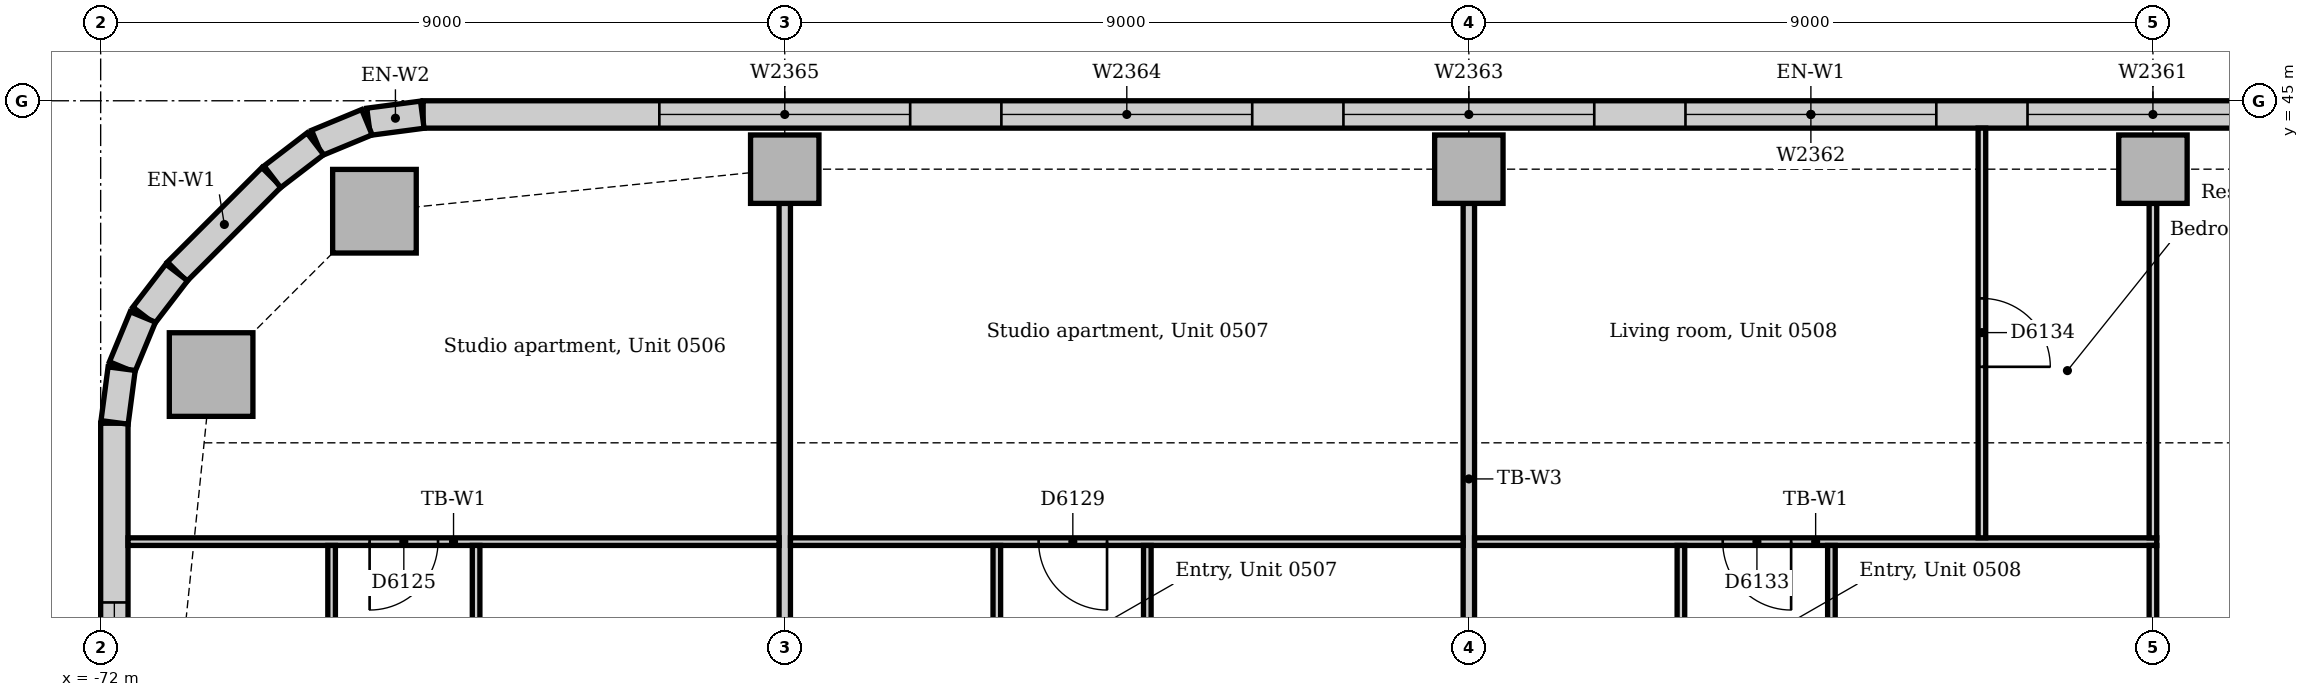
"""IFC4 building model, lengths in metres.
Left out: names, types, materials, properties, quantities, classifications, styles, units other than length and angle.
Written with IfcOpenShell. Run it as: python <this file> out.ifc"""

import sys

from ifc_helpers import new_model, si_unit, direction, frame, frame_2d, origin, origin_2d, place, context, subcontext, project, spatial, rectangle, extrude, element, fill, save


model = new_model("IFC4")
c1 = context("Model", 3, precision=1e-05, world=origin(), true_north=direction((0.0, 1.0)))
c2 = subcontext(c1, "Body", "Model", "MODEL_VIEW")
j1 = project(units=[si_unit("LENGTHUNIT", "METRE"), si_unit("PLANEANGLEUNIT", "RADIAN")], contexts=[c1])
p1 = place(None, origin())
s1 = spatial("IfcSite", under=j1, at=p1, CompositionType="ELEMENT")
p2 = place(p1, origin())
s2 = spatial("IfcBuilding", under=s1, at=p2, CompositionType="ELEMENT")
p3 = place(p2, frame((0.0, 0.0, 26.0)))
s3 = spatial("IfcBuildingStorey", under=s2, at=p3, CompositionType="ELEMENT", Elevation=26.0)
for number, where, z_axis, x_axis in (
    (1, (-68.398, 43.547, 0.0), (0.0, 0.0, 1.0), (1.0, 0.0, 0.0)),
    (2, (-70.547, 41.398, 0.0), (0.0, 0.0, 1.0), (1.0, 0.0, 0.0)),
):
    element("IfcColumn", number, at=place(p3, frame(where, z_axis=z_axis, x_axis=x_axis)), inside=s3, PredefinedType="COLUMN", context=c2, shape_type="SweptSolid", body=[
        extrude(rectangle(XDim=1.1, YDim=1.1, at=origin_2d()), origin(), (0.0, 0.0, 1.0), 3.85),
    ])
for number, where, z_axis, x_axis in (
    (3, (-63.0, 44.1, 0.0), (0.0, 0.0, 1.0), (1.0, 0.0, 0.0)),
    (4, (-54.0, 44.1, 0.0), (0.0, 0.0, 1.0), (1.0, 0.0, 0.0)),
    (5, (-45.0, 44.1, 0.0), (0.0, 0.0, 1.0), (1.0, 0.0, 0.0)),
):
    element("IfcColumn", number, at=place(p3, frame(where, z_axis=z_axis, x_axis=x_axis)), inside=s3, PredefinedType="COLUMN", context=c2, shape_type="SweptSolid", body=[
        extrude(rectangle(XDim=0.9, YDim=0.9, at=origin_2d()), origin(), (0.0, 0.0, 1.0), 3.85),
    ])
p4 = place(p3, frame((-31.243, 44.82, 0.0), z_axis=(0.0, 0.0, 1.0), x_axis=(-1.0, 0.0, 0.0)))
e6 = element("IfcWall", 6, at=p4, inside=s3, PredefinedType="STANDARD", context=c2, shape_type="SweptSolid", body=[
    extrude(rectangle(XDim=36.515, YDim=0.36, at=frame_2d((18.257, 0.0))), origin(), (0.0, 0.0, 1.0), 3.85),
])
p5 = place(p4, frame((3.107, 0.0, 0.9)))
e7 = element("IfcOpeningElement", 7, at=p5, cuts=e6, PredefinedType="OPENING", context=c2, shape_type="SweptSolid", body=[
    extrude(rectangle(XDim=3.3, YDim=1.6, at=frame_2d((1.65, 0.8))), frame((0.0, 0.19, 0.0), z_axis=(0.0, -1.0, 0.0), x_axis=(1.0, 0.0, 0.0)), (0.0, 0.0, 1.0), 0.38),
])
p6 = place(p4, frame((7.607, 0.0, 0.9)))
e8 = element("IfcOpeningElement", 8, at=p6, cuts=e6, PredefinedType="OPENING", context=c2, shape_type="SweptSolid", body=[
    extrude(rectangle(XDim=3.3, YDim=1.6, at=frame_2d((1.65, 0.8))), frame((0.0, 0.19, 0.0), z_axis=(0.0, -1.0, 0.0), x_axis=(1.0, 0.0, 0.0)), (0.0, 0.0, 1.0), 0.38),
])
p7 = place(p4, frame((12.107, 0.0, 0.9)))
e9 = element("IfcOpeningElement", 9, at=p7, cuts=e6, PredefinedType="OPENING", context=c2, shape_type="SweptSolid", body=[
    extrude(rectangle(XDim=3.3, YDim=1.6, at=frame_2d((1.65, 0.8))), frame((0.0, 0.19, 0.0), z_axis=(0.0, -1.0, 0.0), x_axis=(1.0, 0.0, 0.0)), (0.0, 0.0, 1.0), 0.38),
])
p8 = place(p4, frame((16.607, 0.0, 0.9)))
e10 = element("IfcOpeningElement", 10, at=p8, cuts=e6, PredefinedType="OPENING", context=c2, shape_type="SweptSolid", body=[
    extrude(rectangle(XDim=3.3, YDim=1.6, at=frame_2d((1.65, 0.8))), frame((0.0, 0.19, 0.0), z_axis=(0.0, -1.0, 0.0), x_axis=(1.0, 0.0, 0.0)), (0.0, 0.0, 1.0), 0.38),
])
p9 = place(p4, frame((21.107, 0.0, 0.9)))
e11 = element("IfcOpeningElement", 11, at=p9, cuts=e6, PredefinedType="OPENING", context=c2, shape_type="SweptSolid", body=[
    extrude(rectangle(XDim=3.3, YDim=1.6, at=frame_2d((1.65, 0.8))), frame((0.0, 0.19, 0.0), z_axis=(0.0, -1.0, 0.0), x_axis=(1.0, 0.0, 0.0)), (0.0, 0.0, 1.0), 0.38),
])
p10 = place(p4, frame((25.607, 0.0, 0.9)))
e12 = element("IfcOpeningElement", 12, at=p10, cuts=e6, PredefinedType="OPENING", context=c2, shape_type="SweptSolid", body=[
    extrude(rectangle(XDim=3.3, YDim=1.6, at=frame_2d((1.65, 0.8))), frame((0.0, 0.19, 0.0), z_axis=(0.0, -1.0, 0.0), x_axis=(1.0, 0.0, 0.0)), (0.0, 0.0, 1.0), 0.38),
])
p11 = place(p4, frame((30.107, 0.0, 0.9)))
e13 = element("IfcOpeningElement", 13, at=p11, cuts=e6, PredefinedType="OPENING", context=c2, shape_type="SweptSolid", body=[
    extrude(rectangle(XDim=3.3, YDim=1.6, at=frame_2d((1.65, 0.8))), frame((0.0, 0.19, 0.0), z_axis=(0.0, -1.0, 0.0), x_axis=(1.0, 0.0, 0.0)), (0.0, 0.0, 1.0), 0.38),
])
p12 = place(p3, frame((-69.751, 43.994, 0.0), z_axis=(0.0, 0.0, 1.0), x_axis=(-0.707106781187, -0.707106781187, 0.0)))
e14 = element("IfcWall", 14, at=p12, inside=s3, PredefinedType="STANDARD", context=c2, shape_type="SweptSolid", body=[
    extrude(rectangle(XDim=1.757, YDim=0.36, at=frame_2d((0.879, 0.0))), origin(), (0.0, 0.0, 1.0), 3.85),
])
p13 = place(p3, frame((-71.82, 40.757, 0.0), z_axis=(0.0, 0.0, 1.0), x_axis=(0.0, -1.0, 0.0)))
e15 = element("IfcWall", 15, at=p13, inside=s3, PredefinedType="STANDARD", context=c2, shape_type="SweptSolid", body=[
    extrude(rectangle(XDim=26.015, YDim=0.36, at=frame_2d((13.007, 0.0))), origin(), (0.0, 0.0, 1.0), 3.85),
])
p14 = place(p13, frame((2.357, 0.0, 0.9)))
e16 = element("IfcOpeningElement", 16, at=p14, cuts=e15, PredefinedType="OPENING", context=c2, shape_type="SweptSolid", body=[
    extrude(rectangle(XDim=3.3, YDim=1.6, at=frame_2d((1.65, 0.8))), frame((0.0, 0.19, 0.0), z_axis=(0.0, -1.0, 0.0), x_axis=(1.0, 0.0, 0.0)), (0.0, 0.0, 1.0), 0.38),
])
p15 = place(p13, frame((7.057, 0.0, 0.9)))
e17 = element("IfcOpeningElement", 17, at=p15, cuts=e15, PredefinedType="OPENING", context=c2, shape_type="SweptSolid", body=[
    extrude(rectangle(XDim=3.3, YDim=1.6, at=frame_2d((1.65, 0.8))), frame((0.0, 0.19, 0.0), z_axis=(0.0, -1.0, 0.0), x_axis=(1.0, 0.0, 0.0)), (0.0, 0.0, 1.0), 0.38),
])
p16 = place(p13, frame((11.357, 0.0, 0.9)))
e18 = element("IfcOpeningElement", 18, at=p16, cuts=e15, PredefinedType="OPENING", context=c2, shape_type="SweptSolid", body=[
    extrude(rectangle(XDim=3.3, YDim=1.6, at=frame_2d((1.65, 0.8))), frame((0.0, 0.19, 0.0), z_axis=(0.0, -1.0, 0.0), x_axis=(1.0, 0.0, 0.0)), (0.0, 0.0, 1.0), 0.38),
])
p17 = place(p13, frame((15.857, 0.0, 0.9)))
e19 = element("IfcOpeningElement", 19, at=p17, cuts=e15, PredefinedType="OPENING", context=c2, shape_type="SweptSolid", body=[
    extrude(rectangle(XDim=3.3, YDim=1.6, at=frame_2d((1.65, 0.8))), frame((0.0, 0.19, 0.0), z_axis=(0.0, -1.0, 0.0), x_axis=(1.0, 0.0, 0.0)), (0.0, 0.0, 1.0), 0.38),
])
p18 = place(p13, frame((20.957, 0.0, 0.9)))
e20 = element("IfcOpeningElement", 20, at=p18, cuts=e15, PredefinedType="OPENING", context=c2, shape_type="SweptSolid", body=[
    extrude(rectangle(XDim=3.3, YDim=1.6, at=frame_2d((1.65, 0.8))), frame((0.0, 0.19, 0.0), z_axis=(0.0, -1.0, 0.0), x_axis=(1.0, 0.0, 0.0)), (0.0, 0.0, 1.0), 0.38),
])
for number, where, z_axis, x_axis in (
    (21, (-67.769, 44.817, 0.0), (0.0, 0.0, 1.0), (-0.991, -0.131, 0.0)),
    (22, (-68.497, 44.718, 0.0), (0.0, 0.0, 1.0), (-0.924, -0.383, 0.0)),
):
    element("IfcWall", number, at=place(p3, frame(where, z_axis=z_axis, x_axis=x_axis)), inside=s3, PredefinedType="STANDARD", context=c2, shape_type="SweptSolid", body=[
        extrude(rectangle(XDim=0.713, YDim=0.36, at=frame_2d((0.356, 0.0))), origin(), (0.0, 0.0, 1.0), 3.85),
    ])
for number, where, z_axis, x_axis in (
    (23, (-69.175, 44.434, 0.0), (0.0, 0.0, 1.0), (-0.793, -0.609, 0.0)),
    (24, (-71.0, 42.741, 0.0), (0.0, 0.0, 1.0), (-0.609, -0.793, 0.0)),
):
    element("IfcWall", number, at=place(p3, frame(where, z_axis=z_axis, x_axis=x_axis)), inside=s3, PredefinedType="STANDARD", context=c2, shape_type="SweptSolid", body=[
        extrude(rectangle(XDim=0.713, YDim=0.36, at=frame_2d((0.357, 0.0))), origin(), (0.0, 0.0, 1.0), 3.85),
    ])
for number, where, z_axis, x_axis in (
    (25, (-71.445, 42.156, 0.0), (0.0, 0.0, 1.0), (-0.383, -0.924, 0.0)),
    (26, (-71.724, 41.476, 0.0), (0.0, 0.0, 1.0), (-0.131, -0.991, 0.0)),
):
    element("IfcWall", number, at=place(p3, frame(where, z_axis=z_axis, x_axis=x_axis)), inside=s3, PredefinedType="STANDARD", context=c2, shape_type="SweptSolid", body=[
        extrude(rectangle(XDim=0.713, YDim=0.36, at=frame_2d((0.356, 0.0))), origin(), (0.0, 0.0, 1.0), 3.85),
    ])
for number, where, z_axis, x_axis in (
    (27, (-63.0, 36.4, 0.0), (0.0, 0.0, 1.0), (0.0, 1.0, 0.0)),
    (28, (-54.0, 36.4, 0.0), (0.0, 0.0, 1.0), (0.0, 1.0, 0.0)),
):
    element("IfcWall", number, at=place(p3, frame(where, z_axis=z_axis, x_axis=x_axis)), inside=s3, PredefinedType="PARTITIONING", context=c2, shape_type="SweptSolid", body=[
        extrude(rectangle(XDim=7.25, YDim=0.15, at=frame_2d((3.625, 0.0))), origin(), (0.0, 0.0, 1.0), 3.158),
    ])
p19 = place(p3, frame((-53.925, 39.2, 0.0), z_axis=(0.0, 0.0, 1.0), x_axis=(1.0, 0.0, 0.0)))
e29 = element("IfcWall", 29, at=p19, inside=s3, PredefinedType="PARTITIONING", context=c2, shape_type="SweptSolid", body=[
    extrude(rectangle(XDim=8.975, YDim=0.1, at=frame_2d((4.487, 0.0))), origin(), (0.0, 0.0, 1.0), 3.85),
])
p20 = place(p19, frame((3.265, 0.0, 0.0)))
e30 = element("IfcOpeningElement", 30, at=p20, cuts=e29, PredefinedType="OPENING", context=c2, shape_type="SweptSolid", body=[
    extrude(rectangle(XDim=0.9, YDim=2.1, at=frame_2d((0.45, 1.05))), frame((0.0, 0.06, 0.0), z_axis=(0.0, -1.0, 0.0), x_axis=(1.0, 0.0, 0.0)), (0.0, 0.0, 1.0), 0.12),
])
p21 = place(p3, frame((-62.925, 39.2, 0.0), z_axis=(0.0, 0.0, 1.0), x_axis=(1.0, 0.0, 0.0)))
e31 = element("IfcWall", 31, at=p21, inside=s3, PredefinedType="PARTITIONING", context=c2, shape_type="SweptSolid", body=[
    extrude(rectangle(XDim=8.85, YDim=0.1, at=frame_2d((4.425, 0.0))), origin(), (0.0, 0.0, 1.0), 3.85),
])
p22 = place(p21, frame((3.265, 0.0, 0.0)))
e32 = element("IfcOpeningElement", 32, at=p22, cuts=e31, PredefinedType="OPENING", context=c2, shape_type="SweptSolid", body=[
    extrude(rectangle(XDim=0.9, YDim=2.1, at=frame_2d((0.45, 1.05))), frame((0.0, 0.06, 0.0), z_axis=(0.0, -1.0, 0.0), x_axis=(1.0, 0.0, 0.0)), (0.0, 0.0, 1.0), 0.12),
])
p23 = place(p3, frame((-71.64, 39.2, 0.0), z_axis=(0.0, 0.0, 1.0), x_axis=(1.0, 0.0, 0.0)))
e33 = element("IfcWall", 33, at=p23, inside=s3, PredefinedType="PARTITIONING", context=c2, shape_type="SweptSolid", body=[
    extrude(rectangle(XDim=8.565, YDim=0.1, at=frame_2d((4.282, 0.0))), origin(), (0.0, 0.0, 1.0), 3.85),
])
p24 = place(p23, frame((3.178, 0.0, 0.0)))
e34 = element("IfcOpeningElement", 34, at=p24, cuts=e33, PredefinedType="OPENING", context=c2, shape_type="SweptSolid", body=[
    extrude(rectangle(XDim=0.9, YDim=2.1, at=frame_2d((0.45, 1.05))), frame((0.0, 0.06, 0.0), z_axis=(0.0, -1.0, 0.0), x_axis=(1.0, 0.0, 0.0)), (0.0, 0.0, 1.0), 0.12),
])
p25 = place(p3, frame((-45.0, 39.25, 0.0), z_axis=(0.0, 0.0, 1.0), x_axis=(0.0, 1.0, 0.0)))
e35 = element("IfcWall", 35, at=p25, inside=s3, PredefinedType="PARTITIONING", context=c2, shape_type="SweptSolid", body=[
    extrude(rectangle(XDim=4.4, YDim=0.1, at=frame_2d((2.2, 0.0))), origin(), (0.0, 0.0, 1.0), 3.158),
])
p26 = place(p3, frame((-45.0, 36.4, 0.0), z_axis=(0.0, 0.0, 1.0), x_axis=(0.0, 1.0, 0.0)))
e36 = element("IfcWall", 36, at=p26, inside=s3, PredefinedType="PARTITIONING", context=c2, shape_type="SweptSolid", body=[
    extrude(rectangle(XDim=2.75, YDim=0.1, at=frame_2d((1.375, 0.0))), origin(), (0.0, 0.0, 1.0), 3.158),
])
p27 = place(p3, frame((-47.25, 39.25, 0.0), z_axis=(0.0, 0.0, 1.0), x_axis=(0.0, 1.0, 0.0)))
e37 = element("IfcWall", 37, at=p27, inside=s3, PredefinedType="PARTITIONING", context=c2, shape_type="SweptSolid", body=[
    extrude(rectangle(XDim=5.39, YDim=0.1, at=frame_2d((2.695, 0.0))), origin(), (0.0, 0.0, 1.0), 3.85),
])
p28 = place(p27, frame((2.25, 0.0, 0.0)))
e38 = element("IfcOpeningElement", 38, at=p28, cuts=e37, PredefinedType="OPENING", context=c2, shape_type="SweptSolid", body=[
    extrude(rectangle(XDim=0.9, YDim=2.1, at=frame_2d((0.45, 1.05))), frame((0.0, 0.06, 0.0), z_axis=(0.0, -1.0, 0.0), x_axis=(1.0, 0.0, 0.0)), (0.0, 0.0, 1.0), 0.12),
])
p29 = place(p3, frame((-68.962, 36.075, 0.0), z_axis=(0.0, 0.0, 1.0), x_axis=(0.0, 1.0, 0.0)))
e39 = element("IfcWall", 39, at=p29, inside=s3, PredefinedType="PARTITIONING", context=c2, shape_type="SweptSolid", body=[
    extrude(rectangle(XDim=3.075, YDim=0.1, at=frame_2d((1.538, 0.0))), origin(), (0.0, 0.0, 1.0), 3.85),
])
p30 = place(p29, frame((1.1, 0.0, 0.0)))
e40 = element("IfcOpeningElement", 40, at=p30, cuts=e39, PredefinedType="OPENING", context=c2, shape_type="SweptSolid", body=[
    extrude(rectangle(XDim=0.9, YDim=2.1, at=frame_2d((0.45, 1.05))), frame((0.0, 0.06, 0.0), z_axis=(0.0, -1.0, 0.0), x_axis=(1.0, 0.0, 0.0)), (0.0, 0.0, 1.0), 0.12),
])
p31 = place(p3, frame((-67.061, 36.075, 0.0), z_axis=(0.0, 0.0, 1.0), x_axis=(0.0, 1.0, 0.0)))
e41 = element("IfcWall", 41, at=p31, inside=s3, PredefinedType="PARTITIONING", context=c2, shape_type="SweptSolid", body=[
    extrude(rectangle(XDim=3.075, YDim=0.1, at=frame_2d((1.538, 0.0))), origin(), (0.0, 0.0, 1.0), 3.85),
])
p32 = place(p31, frame((1.1, 0.0, 0.0)))
e42 = element("IfcOpeningElement", 42, at=p32, cuts=e41, PredefinedType="OPENING", context=c2, shape_type="SweptSolid", body=[
    extrude(rectangle(XDim=0.9, YDim=2.1, at=frame_2d((0.45, 1.05))), frame((0.0, 0.06, 0.0), z_axis=(0.0, -1.0, 0.0), x_axis=(1.0, 0.0, 0.0)), (0.0, 0.0, 1.0), 0.12),
])
p33 = place(p3, frame((-60.21, 36.075, 0.0), z_axis=(0.0, 0.0, 1.0), x_axis=(0.0, 1.0, 0.0)))
e43 = element("IfcWall", 43, at=p33, inside=s3, PredefinedType="PARTITIONING", context=c2, shape_type="SweptSolid", body=[
    extrude(rectangle(XDim=3.075, YDim=0.1, at=frame_2d((1.538, 0.0))), origin(), (0.0, 0.0, 1.0), 3.85),
])
p34 = place(p33, frame((1.1, 0.0, 0.0)))
e44 = element("IfcOpeningElement", 44, at=p34, cuts=e43, PredefinedType="OPENING", context=c2, shape_type="SweptSolid", body=[
    extrude(rectangle(XDim=0.9, YDim=2.1, at=frame_2d((0.45, 1.05))), frame((0.0, 0.06, 0.0), z_axis=(0.0, -1.0, 0.0), x_axis=(1.0, 0.0, 0.0)), (0.0, 0.0, 1.0), 0.12),
])
p35 = place(p3, frame((-58.23, 36.075, 0.0), z_axis=(0.0, 0.0, 1.0), x_axis=(0.0, 1.0, 0.0)))
e45 = element("IfcWall", 45, at=p35, inside=s3, PredefinedType="PARTITIONING", context=c2, shape_type="SweptSolid", body=[
    extrude(rectangle(XDim=3.075, YDim=0.1, at=frame_2d((1.538, 0.0))), origin(), (0.0, 0.0, 1.0), 3.85),
])
p36 = place(p35, frame((1.1, 0.0, 0.0)))
e46 = element("IfcOpeningElement", 46, at=p36, cuts=e45, PredefinedType="OPENING", context=c2, shape_type="SweptSolid", body=[
    extrude(rectangle(XDim=0.9, YDim=2.1, at=frame_2d((0.45, 1.05))), frame((0.0, 0.06, 0.0), z_axis=(0.0, -1.0, 0.0), x_axis=(1.0, 0.0, 0.0)), (0.0, 0.0, 1.0), 0.12),
])
p37 = place(p3, frame((-51.21, 36.075, 0.0), z_axis=(0.0, 0.0, 1.0), x_axis=(0.0, 1.0, 0.0)))
e47 = element("IfcWall", 47, at=p37, inside=s3, PredefinedType="PARTITIONING", context=c2, shape_type="SweptSolid", body=[
    extrude(rectangle(XDim=3.075, YDim=0.1, at=frame_2d((1.538, 0.0))), origin(), (0.0, 0.0, 1.0), 3.85),
])
p38 = place(p37, frame((1.1, 0.0, 0.0)))
e48 = element("IfcOpeningElement", 48, at=p38, cuts=e47, PredefinedType="OPENING", context=c2, shape_type="SweptSolid", body=[
    extrude(rectangle(XDim=0.9, YDim=2.1, at=frame_2d((0.45, 1.05))), frame((0.0, 0.06, 0.0), z_axis=(0.0, -1.0, 0.0), x_axis=(1.0, 0.0, 0.0)), (0.0, 0.0, 1.0), 0.12),
])
p39 = place(p3, frame((-49.23, 36.075, 0.0), z_axis=(0.0, 0.0, 1.0), x_axis=(0.0, 1.0, 0.0)))
e49 = element("IfcWall", 49, at=p39, inside=s3, PredefinedType="PARTITIONING", context=c2, shape_type="SweptSolid", body=[
    extrude(rectangle(XDim=3.075, YDim=0.1, at=frame_2d((1.538, 0.0))), origin(), (0.0, 0.0, 1.0), 3.85),
])
p40 = place(p39, frame((1.1, 0.0, 0.0)))
e50 = element("IfcOpeningElement", 50, at=p40, cuts=e49, PredefinedType="OPENING", context=c2, shape_type="SweptSolid", body=[
    extrude(rectangle(XDim=0.9, YDim=2.1, at=frame_2d((0.45, 1.05))), frame((0.0, 0.06, 0.0), z_axis=(0.0, -1.0, 0.0), x_axis=(1.0, 0.0, 0.0)), (0.0, 0.0, 1.0), 0.12),
])
p41 = place(p7, origin())
e51 = element("IfcWindow", 51, at=p41, inside=s3, PartitioningType="SINGLE_PANEL", PredefinedType="WINDOW", context=c2, shape_type="SweptSolid", body=[
    extrude(rectangle(XDim=3.3, YDim=1.6, at=frame_2d((1.65, 0.8))), frame((0.0, 0.13, 0.0), z_axis=(0.0, -1.0, 0.0), x_axis=(1.0, 0.0, 0.0)), (0.0, 0.0, 1.0), 0.06),
])
fill(e9, e51)
p42 = place(p8, origin())
e52 = element("IfcWindow", 52, at=p42, inside=s3, PartitioningType="SINGLE_PANEL", PredefinedType="WINDOW", context=c2, shape_type="SweptSolid", body=[
    extrude(rectangle(XDim=3.3, YDim=1.6, at=frame_2d((1.65, 0.8))), frame((0.0, 0.13, 0.0), z_axis=(0.0, -1.0, 0.0), x_axis=(1.0, 0.0, 0.0)), (0.0, 0.0, 1.0), 0.06),
])
fill(e10, e52)
p43 = place(p9, origin())
e53 = element("IfcWindow", 53, at=p43, inside=s3, PartitioningType="SINGLE_PANEL", PredefinedType="WINDOW", context=c2, shape_type="SweptSolid", body=[
    extrude(rectangle(XDim=3.3, YDim=1.6, at=frame_2d((1.65, 0.8))), frame((0.0, 0.13, 0.0), z_axis=(0.0, -1.0, 0.0), x_axis=(1.0, 0.0, 0.0)), (0.0, 0.0, 1.0), 0.06),
])
fill(e11, e53)
p44 = place(p10, origin())
e54 = element("IfcWindow", 54, at=p44, inside=s3, PartitioningType="SINGLE_PANEL", PredefinedType="WINDOW", context=c2, shape_type="SweptSolid", body=[
    extrude(rectangle(XDim=3.3, YDim=1.6, at=frame_2d((1.65, 0.8))), frame((0.0, 0.13, 0.0), z_axis=(0.0, -1.0, 0.0), x_axis=(1.0, 0.0, 0.0)), (0.0, 0.0, 1.0), 0.06),
])
fill(e12, e54)
p45 = place(p11, origin())
e55 = element("IfcWindow", 55, at=p45, inside=s3, PartitioningType="SINGLE_PANEL", PredefinedType="WINDOW", context=c2, shape_type="SweptSolid", body=[
    extrude(rectangle(XDim=3.3, YDim=1.6, at=frame_2d((1.65, 0.8))), frame((0.0, 0.13, 0.0), z_axis=(0.0, -1.0, 0.0), x_axis=(1.0, 0.0, 0.0)), (0.0, 0.0, 1.0), 0.06),
])
fill(e13, e55)
p46 = place(p14, origin())
e56 = element("IfcWindow", 56, at=p46, inside=s3, PartitioningType="SINGLE_PANEL", PredefinedType="WINDOW", context=c2, shape_type="SweptSolid", body=[
    extrude(rectangle(XDim=3.3, YDim=1.6, at=frame_2d((1.65, 0.8))), frame((0.0, 0.13, 0.0), z_axis=(0.0, -1.0, 0.0), x_axis=(1.0, 0.0, 0.0)), (0.0, 0.0, 1.0), 0.06),
])
fill(e16, e56)
p47 = place(p24, frame((0.9, 0.0, 0.0), z_axis=(0.0, 0.0, 1.0), x_axis=(-1.0, 0.0, 0.0)))
e57 = element("IfcDoor", 57, at=p47, inside=s3, OperationType="SINGLE_SWING_RIGHT", PredefinedType="DOOR", context=c2, shape_type="SweptSolid", body=[
    extrude(rectangle(XDim=0.9, YDim=2.1, at=frame_2d((0.45, 1.05))), frame((0.0, 0.025, 0.0), z_axis=(0.0, -1.0, 0.0), x_axis=(1.0, 0.0, 0.0)), (0.0, 0.0, 1.0), 0.05),
])
fill(e34, e57)
p48 = place(p22, frame((0.9, 0.0, 0.0), z_axis=(0.0, 0.0, 1.0), x_axis=(-1.0, 0.0, 0.0)))
e58 = element("IfcDoor", 58, at=p48, inside=s3, OperationType="SINGLE_SWING_LEFT", PredefinedType="DOOR", context=c2, shape_type="SweptSolid", body=[
    extrude(rectangle(XDim=0.9, YDim=2.1, at=frame_2d((0.45, 1.05))), frame((0.0, 0.025, 0.0), z_axis=(0.0, -1.0, 0.0), x_axis=(1.0, 0.0, 0.0)), (0.0, 0.0, 1.0), 0.05),
])
fill(e32, e58)
p49 = place(p20, frame((0.9, 0.0, 0.0), z_axis=(0.0, 0.0, 1.0), x_axis=(-1.0, 0.0, 0.0)))
e59 = element("IfcDoor", 59, at=p49, inside=s3, OperationType="SINGLE_SWING_LEFT", PredefinedType="DOOR", context=c2, shape_type="SweptSolid", body=[
    extrude(rectangle(XDim=0.9, YDim=2.1, at=frame_2d((0.45, 1.05))), frame((0.0, 0.025, 0.0), z_axis=(0.0, -1.0, 0.0), x_axis=(1.0, 0.0, 0.0)), (0.0, 0.0, 1.0), 0.05),
])
fill(e30, e59)
p50 = place(p28, frame((0.9, 0.0, 0.0), z_axis=(0.0, 0.0, 1.0), x_axis=(-1.0, 0.0, 0.0)))
e60 = element("IfcDoor", 60, at=p50, inside=s3, OperationType="SINGLE_SWING_RIGHT", PredefinedType="DOOR", context=c2, shape_type="SweptSolid", body=[
    extrude(rectangle(XDim=0.9, YDim=2.1, at=frame_2d((0.45, 1.05))), frame((0.0, 0.025, 0.0), z_axis=(0.0, -1.0, 0.0), x_axis=(1.0, 0.0, 0.0)), (0.0, 0.0, 1.0), 0.05),
])
fill(e38, e60)
save(model, sys.argv[1])
